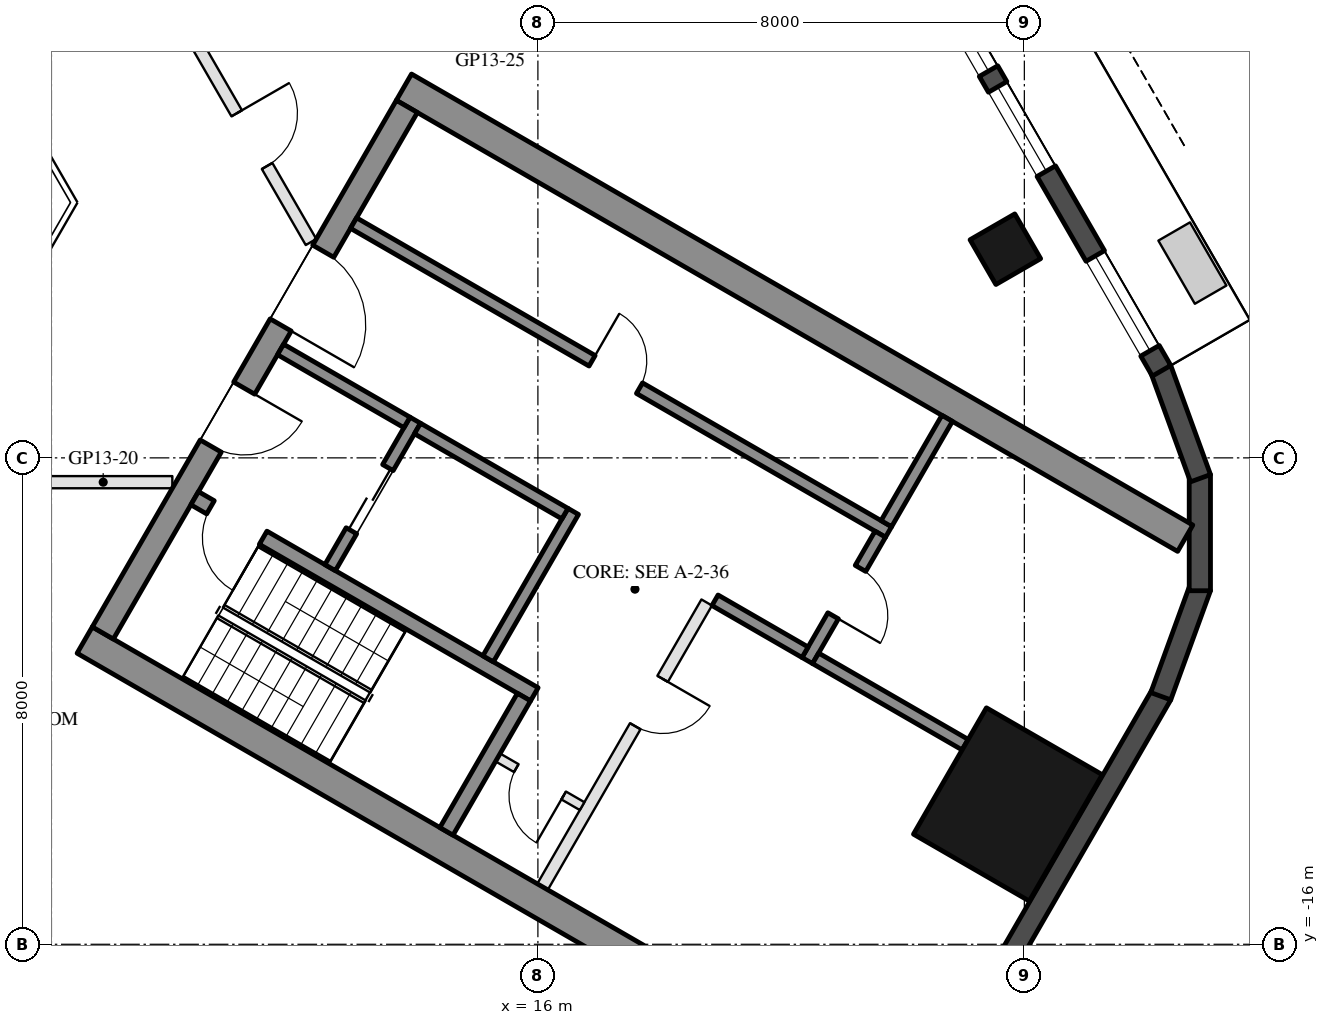
"""IFC4 building model, lengths in metres.
Left out: names, types, materials, properties, quantities, classifications, styles, units other than length and angle.
Written with IfcOpenShell. Run it as: python <this file> out.ifc"""

import sys

from ifc_helpers import new_model, si_unit, direction, frame, frame_2d, origin, origin_2d, place, context, subcontext, project, spatial, rectangle, hollow_rectangle, extrude, element, fill, save


model = new_model("IFC4")
c1 = context("Model", 3, precision=1e-05, world=origin(), true_north=direction((0.0, 1.0)))
c2 = subcontext(c1, "Body", "Model", "MODEL_VIEW")
j1 = project(units=[si_unit("LENGTHUNIT", "METRE"), si_unit("PLANEANGLEUNIT", "RADIAN")], contexts=[c1])
p1 = place(None, origin())
s1 = spatial("IfcSite", under=j1, at=p1, CompositionType="ELEMENT")
p2 = place(p1, origin())
s2 = spatial("IfcBuilding", under=s1, at=p2, CompositionType="ELEMENT")
p3 = place(p2, frame((0.0, 0.0, 157.7)))
s3 = spatial("IfcBuildingStorey", under=s2, at=p3, CompositionType="ELEMENT", Elevation=157.7)
p4 = place(p3, frame((23.688, -4.568, 0.0), z_axis=(0.0, 0.0, 1.0), x_axis=(-0.5, 0.866025403784, 0.0)))
e1 = element("IfcColumn", 1, at=p4, inside=s3, PredefinedType="COLUMN", context=c2, shape_type="SweptSolid", body=[
    extrude(hollow_rectangle(XDim=0.85, YDim=0.85, WallThickness=0.04, at=origin_2d()), origin(), (0.0, 0.0, 1.0), 3.7),
])
p5 = place(p3, frame((23.729, -13.7, 0.0), z_axis=(0.0, 0.0, 1.0), x_axis=(0.5, 0.866025403784, 0.0)))
e2 = element("IfcColumn", 2, at=p5, inside=s3, PredefinedType="COLUMN", context=c2, shape_type="SweptSolid", body=[
    extrude(hollow_rectangle(XDim=2.4, YDim=2.2, WallThickness=0.06, at=origin_2d()), origin(), (0.0, 0.0, 1.0), 3.7),
])
p6 = place(p3, frame((23.427, -16.792, 0.0), z_axis=(0.0, 0.0, 1.0), x_axis=(0.500018773155, 0.866014564827, 0.0)))
e3 = element("IfcWall", 3, at=p6, inside=s3, PredefinedType="SOLIDWALL", context=c2, shape_type="SweptSolid", body=[
    extrude(rectangle(XDim=5.658, YDim=0.35, at=frame_2d((2.829, 0.0))), origin(), (0.0, 0.0, 1.0), 3.55),
])
for number, where, z_axis, x_axis in (
    (4, (26.244, -11.92, 0.0), (0.0, 0.0, 1.0), (0.342, 0.94, 0.0)),
    (5, (26.886, -10.185, 0.0), (0.0, 0.0, 1.0), (0.0, 1.0, 0.0)),
    (6, (26.897, -8.335, 0.0), (0.0, 0.0, 1.0), (-0.342, 0.94, 0.0)),
):
    element("IfcWall", number, at=place(p3, frame(where, z_axis=z_axis, x_axis=x_axis)), inside=s3, PredefinedType="SOLIDWALL", context=c2, shape_type="SweptSolid", body=[
        extrude(rectangle(XDim=1.91, YDim=0.35, at=frame_2d((0.955, 0.0))), origin(), (0.0, 0.0, 1.0), 3.55),
    ])
p7 = place(p3, frame((26.257, -6.567, 0.0), z_axis=(0.0, 0.0, 1.0), x_axis=(-0.500023526245, 0.866011820475, 0.0)))
e7 = element("IfcWall", 7, at=p7, inside=s3, PredefinedType="SOLIDWALL", context=c2, shape_type="SweptSolid", body=[
    extrude(rectangle(XDim=11.816, YDim=0.35, at=frame_2d((5.908, 0.0))), origin(), (0.0, 0.0, 1.0), 3.55),
])
p8 = place(p7, frame((0.38, 0.0, 0.3)))
e8 = element("IfcOpeningElement", 8, at=p8, cuts=e7, PredefinedType="OPENING", context=c2, shape_type="SweptSolid", body=[
    extrude(rectangle(XDim=1.8, YDim=2.65, at=frame_2d((0.9, 1.325))), frame((0.0, 0.185, 0.0), z_axis=(0.0, -1.0, 0.0), x_axis=(1.0, 0.0, 0.0)), (0.0, 0.0, 1.0), 0.37),
])
p9 = place(p7, frame((7.741, 0.0, 0.0)))
e9 = element("IfcOpeningElement", 9, at=p9, cuts=e7, PredefinedType="OPENING", context=c2, shape_type="SweptSolid", body=[
    extrude(rectangle(XDim=2.4, YDim=2.4, at=frame_2d((1.2, 1.2))), frame((0.0, 0.185, 0.0), z_axis=(0.0, -1.0, 0.0), x_axis=(1.0, 0.0, 0.0)), (0.0, 0.0, 1.0), 0.37),
])
p10 = place(p7, frame((3.791, 0.0, 0.3)))
e10 = element("IfcOpeningElement", 10, at=p10, cuts=e7, PredefinedType="OPENING", context=c2, shape_type="SweptSolid", body=[
    extrude(rectangle(XDim=1.6, YDim=2.65, at=frame_2d((0.8, 1.325))), frame((0.0, 0.185, 0.0), z_axis=(0.0, -1.0, 0.0), x_axis=(1.0, 0.0, 0.0)), (0.0, 0.0, 1.0), 0.37),
])
p11 = place(p7, frame((5.691, 0.0, 0.3)))
e11 = element("IfcOpeningElement", 11, at=p11, cuts=e7, PredefinedType="OPENING", context=c2, shape_type="SweptSolid", body=[
    extrude(rectangle(XDim=1.6, YDim=2.65, at=frame_2d((0.8, 1.325))), frame((0.0, 0.185, 0.0), z_axis=(0.0, -1.0, 0.0), x_axis=(1.0, 0.0, 0.0)), (0.0, 0.0, 1.0), 0.37),
])
for number, where, z_axis, x_axis in (
    (12, (8.547, -10.997, 0.0), (0.0, 0.0, 1.0), (0.866, -0.5, 0.0)),
    (13, (13.797, -1.903, 0.0), (0.0, 0.0, 1.0), (0.866, -0.5, 0.0)),
):
    element("IfcWall", number, at=place(p3, frame(where, z_axis=z_axis, x_axis=x_axis)), inside=s3, PredefinedType="SHEAR", context=c2, shape_type="SweptSolid", body=[
        extrude(rectangle(XDim=14.837, YDim=0.5, at=frame_2d((7.418, 0.0))), origin(), (0.0, 0.0, 1.0), 3.5),
    ])
p12 = place(p3, frame((8.845, -10.88, 0.0), z_axis=(0.0, 0.0, 1.0), x_axis=(0.500004234368, 0.866022959057, 0.0)))
e14 = element("IfcWall", 14, at=p12, inside=s3, PredefinedType="SHEAR", context=c2, shape_type="SweptSolid", body=[
    extrude(rectangle(XDim=10.0, YDim=0.4, at=frame_2d((5.0, 0.0))), origin(), (0.0, 0.0, 1.0), 3.5),
])
p13 = place(p12, frame((3.55, 0.0, 0.0)))
e15 = element("IfcOpeningElement", 15, at=p13, cuts=e14, PredefinedType="OPENING", context=c2, shape_type="SweptSolid", body=[
    extrude(rectangle(XDim=1.1, YDim=2.1, at=frame_2d((0.55, 1.05))), frame((0.0, 0.21, 0.0), z_axis=(0.0, -1.0, 0.0), x_axis=(1.0, 0.0, 0.0)), (0.0, 0.0, 1.0), 0.42),
])
p14 = place(p12, frame((5.85, 0.0, 0.0)))
e16 = element("IfcOpeningElement", 16, at=p14, cuts=e14, PredefinedType="OPENING", context=c2, shape_type="SweptSolid", body=[
    extrude(rectangle(XDim=1.4, YDim=2.1, at=frame_2d((0.7, 1.05))), frame((0.0, 0.21, 0.0), z_axis=(0.0, -1.0, 0.0), x_axis=(1.0, 0.0, 0.0)), (0.0, 0.0, 1.0), 0.42),
])
p15 = place(p3, frame((10.356, -8.664, 0.0), z_axis=(0.0, 0.0, 1.0), x_axis=(0.866028629588, -0.499994412703, 0.0)))
e17 = element("IfcWall", 17, at=p15, inside=s3, PredefinedType="SHEAR", context=c2, shape_type="SweptSolid", body=[
    extrude(rectangle(XDim=6.45, YDim=0.25, at=frame_2d((3.225, 0.0))), origin(), (0.0, 0.0, 1.0), 3.5),
])
p16 = place(p15, frame((0.3, 0.0, 0.0)))
e18 = element("IfcOpeningElement", 18, at=p16, cuts=e17, PredefinedType="OPENING", context=c2, shape_type="SweptSolid", body=[
    extrude(rectangle(XDim=1.0, YDim=2.1, at=frame_2d((0.5, 1.05))), frame((0.0, 0.135, 0.0), z_axis=(0.0, -1.0, 0.0), x_axis=(1.0, 0.0, 0.0)), (0.0, 0.0, 1.0), 0.27),
])
p17 = place(p3, frame((14.496, -14.143, 0.0), z_axis=(0.0, 0.0, 1.0), x_axis=(0.500062241894, 0.865989465428, 0.0)))
e19 = element("IfcWall", 19, at=p17, inside=s3, PredefinedType="SHEAR", context=c2, shape_type="SweptSolid", body=[
    extrude(rectangle(XDim=2.55, YDim=0.25, at=frame_2d((1.275, 0.0))), origin(), (0.0, 0.0, 1.0), 3.5),
])
p18 = place(p3, frame((15.181, -11.305, 0.0), z_axis=(0.0, 0.0, 1.0), x_axis=(0.49994636267, 0.866056369097, 0.0)))
e20 = element("IfcWall", 20, at=p18, inside=s3, PredefinedType="SHEAR", context=c2, shape_type="SweptSolid", body=[
    extrude(rectangle(XDim=2.8, YDim=0.2, at=frame_2d((1.4, 0.0))), origin(), (0.0, 0.0, 1.0), 3.5),
])
p19 = place(p3, frame((12.583, -9.805, 0.0), z_axis=(0.0, 0.0, 1.0), x_axis=(0.49994636267, 0.866056369097, 0.0)))
e21 = element("IfcWall", 21, at=p19, inside=s3, PredefinedType="SHEAR", context=c2, shape_type="SweptSolid", body=[
    extrude(rectangle(XDim=2.8, YDim=0.2, at=frame_2d((1.4, 0.0))), origin(), (0.0, 0.0, 1.0), 3.5),
])
p20 = place(p19, frame((0.7, 0.0, 0.0)))
e22 = element("IfcOpeningElement", 22, at=p20, cuts=e21, PredefinedType="OPENING", context=c2, shape_type="SweptSolid", body=[
    extrude(rectangle(XDim=1.2, YDim=2.1, at=frame_2d((0.6, 1.05))), frame((0.0, 0.11, 0.0), z_axis=(0.0, -1.0, 0.0), x_axis=(1.0, 0.0, 0.0)), (0.0, 0.0, 1.0), 0.22),
])
p21 = place(p3, frame((11.768, -6.217, 0.0), z_axis=(0.0, 0.0, 1.0), x_axis=(0.866050077142, -0.499957262057, 0.0)))
e23 = element("IfcWall", 23, at=p21, inside=s3, PredefinedType="SHEAR", context=c2, shape_type="SweptSolid", body=[
    extrude(rectangle(XDim=2.4, YDim=0.2, at=frame_2d((1.2, 0.0))), origin(), (0.0, 0.0, 1.0), 3.5),
])
p22 = place(p3, frame((14.02, -7.517, 0.0), z_axis=(0.0, 0.0, 1.0), x_axis=(0.866034573852, -0.49998411664, 0.0)))
e24 = element("IfcWall", 24, at=p22, inside=s3, PredefinedType="SHEAR", context=c2, shape_type="SweptSolid", body=[
    extrude(rectangle(XDim=2.8, YDim=0.2, at=frame_2d((1.4, 0.0))), origin(), (0.0, 0.0, 1.0), 3.5),
])
p23 = place(p3, frame((12.968, -4.138, 0.0), z_axis=(0.0, 0.0, 1.0), x_axis=(0.866028328073, -0.49999493495, 0.0)))
e25 = element("IfcWall", 25, at=p23, inside=s3, PredefinedType="SHEAR", context=c2, shape_type="SweptSolid", body=[
    extrude(rectangle(XDim=10.16, YDim=0.2, at=frame_2d((5.08, 0.0))), origin(), (0.0, 0.0, 1.0), 3.5),
])
p24 = place(p23, frame((4.53, 0.0, 0.0)))
e26 = element("IfcOpeningElement", 26, at=p24, cuts=e25, PredefinedType="OPENING", context=c2, shape_type="SweptSolid", body=[
    extrude(rectangle(XDim=0.9, YDim=2.1, at=frame_2d((0.45, 1.05))), frame((0.0, 0.11, 0.0), z_axis=(0.0, -1.0, 0.0), x_axis=(1.0, 0.0, 0.0)), (0.0, 0.0, 1.0), 0.22),
])
p25 = place(p3, frame((20.43, -11.333, 0.0), z_axis=(0.0, 0.0, 1.0), x_axis=(0.500001309137, 0.866024647952, 0.0)))
e27 = element("IfcWall", 27, at=p25, inside=s3, PredefinedType="SHEAR", context=c2, shape_type="SweptSolid", body=[
    extrude(rectangle(XDim=2.4, YDim=0.2, at=frame_2d((1.2, 0.0))), origin(), (0.0, 0.0, 1.0), 3.5),
])
p26 = place(p25, frame((0.85, 0.0, 0.0)))
e28 = element("IfcOpeningElement", 28, at=p26, cuts=e27, PredefinedType="OPENING", context=c2, shape_type="SweptSolid", body=[
    extrude(rectangle(XDim=0.9, YDim=2.1, at=frame_2d((0.45, 1.05))), frame((0.0, 0.11, 0.0), z_axis=(0.0, -1.0, 0.0), x_axis=(1.0, 0.0, 0.0)), (0.0, 0.0, 1.0), 0.22),
])
p27 = place(p3, frame((18.913, -10.342, 0.0), z_axis=(0.0, 0.0, 1.0), x_axis=(0.866038183914, -0.499977863513, 0.0)))
e29 = element("IfcWall", 29, at=p27, inside=s3, PredefinedType="SHEAR", context=c2, shape_type="SweptSolid", body=[
    extrude(rectangle(XDim=1.71, YDim=0.2, at=frame_2d((0.855, 0.0))), origin(), (0.0, 0.0, 1.0), 3.5),
])
p28 = place(p3, frame((21.73, -9.082, 0.0), z_axis=(0.0, 0.0, 1.0), x_axis=(0.50002537861, 0.866010750942, 0.0)))
e30 = element("IfcWall", 30, at=p28, inside=s3, PredefinedType="SHEAR", context=c2, shape_type="SweptSolid", body=[
    extrude(rectangle(XDim=2.0, YDim=0.2, at=frame_2d((1.0, 0.0))), origin(), (0.0, 0.0, 1.0), 3.5),
])
p29 = place(p3, frame((20.567, -11.297, 0.0), z_axis=(0.0, 0.0, 1.0), x_axis=(0.866055327414, -0.49994816717, 0.0)))
e31 = element("IfcWall", 31, at=p29, inside=s3, PredefinedType="SHEAR", context=c2, shape_type="SweptSolid", body=[
    extrude(rectangle(XDim=2.84, YDim=0.2, at=frame_2d((1.42, 0.0))), origin(), (0.0, 0.0, 1.0), 3.5),
])
p30 = place(p3, frame((16.076, -15.055, 0.0), z_axis=(0.0, 0.0, 1.0), x_axis=(0.499995103361, 0.866028230842, 0.0)))
e32 = element("IfcWall", 32, at=p30, inside=s3, PredefinedType="PARTITIONING", context=c2, shape_type="SweptSolid", body=[
    extrude(rectangle(XDim=5.4, YDim=0.2, at=frame_2d((2.7, 0.0))), origin(), (0.0, 0.0, 1.0), 3.5),
])
p31 = place(p30, frame((3.05, 0.0, 0.0)))
e33 = element("IfcOpeningElement", 33, at=p31, cuts=e32, PredefinedType="OPENING", context=c2, shape_type="SweptSolid", body=[
    extrude(rectangle(XDim=0.9, YDim=2.1, at=frame_2d((0.45, 1.05))), frame((0.0, 0.11, 0.0), z_axis=(0.0, -1.0, 0.0), x_axis=(1.0, 0.0, 0.0)), (0.0, 0.0, 1.0), 0.22),
])
p32 = place(p3, frame((15.342, -12.928, 0.0), z_axis=(0.0, 0.0, 1.0), x_axis=(0.865989903783, -0.500061482766, 0.0)))
e34 = element("IfcWall", 34, at=p32, inside=s3, PredefinedType="PARTITIONING", context=c2, shape_type="SweptSolid", body=[
    extrude(rectangle(XDim=1.6, YDim=0.15, at=frame_2d((0.8, 0.0))), origin(), (0.0, 0.0, 1.0), 3.5),
])
p33 = place(p32, frame((0.35, 0.0, 0.0)))
e35 = element("IfcOpeningElement", 35, at=p33, cuts=e34, PredefinedType="OPENING", context=c2, shape_type="SweptSolid", body=[
    extrude(rectangle(XDim=0.9, YDim=2.1, at=frame_2d((0.45, 1.05))), frame((0.0, 0.085, 0.0), z_axis=(0.0, -1.0, 0.0), x_axis=(1.0, 0.0, 0.0)), (0.0, 0.0, 1.0), 0.17),
])
p34 = place(p3, frame((9.988, -8.4, 0.0), z_axis=(0.0, 0.0, 1.0), x_axis=(-1.0, 0.0, 0.0)))
e36 = element("IfcWall", 36, at=p34, inside=s3, PredefinedType="PARTITIONING", context=c2, shape_type="SweptSolid", body=[
    extrude(rectangle(XDim=5.686, YDim=0.2, at=frame_2d((2.843, 0.0))), origin(), (0.0, 0.0, 1.0), 2.95),
])
p35 = place(p34, frame((2.343, 0.0, 0.0)))
e37 = element("IfcOpeningElement", 37, at=p35, cuts=e36, PredefinedType="OPENING", context=c2, shape_type="SweptSolid", body=[
    extrude(rectangle(XDim=1.0, YDim=2.1, at=frame_2d((0.5, 1.05))), frame((0.0, 0.11, 0.0), z_axis=(0.0, -1.0, 0.0), x_axis=(1.0, 0.0, 0.0)), (0.0, 0.0, 1.0), 0.22),
])
p36 = place(p3, frame((10.325, -1.083, 0.0), z_axis=(0.0, 0.0, 1.0), x_axis=(0.500008716408, -0.866020371305, 0.0)))
e38 = element("IfcWall", 38, at=p36, inside=s3, PredefinedType="PARTITIONING", context=c2, shape_type="SweptSolid", body=[
    extrude(rectangle(XDim=3.888, YDim=0.2, at=frame_2d((1.944, 0.0))), origin(), (0.0, 0.0, 1.0), 2.95),
])
p37 = place(p36, frame((1.444, 0.0, 0.0)))
e39 = element("IfcOpeningElement", 39, at=p37, cuts=e38, PredefinedType="OPENING", context=c2, shape_type="SweptSolid", body=[
    extrude(rectangle(XDim=1.0, YDim=2.1, at=frame_2d((0.5, 1.05))), frame((0.0, 0.11, 0.0), z_axis=(0.0, -1.0, 0.0), x_axis=(1.0, 0.0, 0.0)), (0.0, 0.0, 1.0), 0.22),
])
p38 = place(p8, origin())
e40 = element("IfcWindow", 40, at=p38, inside=s3, PartitioningType="SINGLE_PANEL", PredefinedType="WINDOW", context=c2, shape_type="SweptSolid", body=[
    extrude(rectangle(XDim=1.8, YDim=2.65, at=frame_2d((0.9, 1.325))), frame((0.0, 0.03, 0.0), z_axis=(0.0, -1.0, 0.0), x_axis=(1.0, 0.0, 0.0)), (0.0, 0.0, 1.0), 0.06),
])
fill(e8, e40)
p39 = place(p10, origin())
e41 = element("IfcWindow", 41, at=p39, inside=s3, PartitioningType="SINGLE_PANEL", PredefinedType="WINDOW", context=c2, shape_type="SweptSolid", body=[
    extrude(rectangle(XDim=1.6, YDim=2.65, at=frame_2d((0.8, 1.325))), frame((0.0, 0.03, 0.0), z_axis=(0.0, -1.0, 0.0), x_axis=(1.0, 0.0, 0.0)), (0.0, 0.0, 1.0), 0.06),
])
fill(e10, e41)
p40 = place(p11, origin())
e42 = element("IfcWindow", 42, at=p40, inside=s3, PartitioningType="SINGLE_PANEL", PredefinedType="WINDOW", context=c2, shape_type="SweptSolid", body=[
    extrude(rectangle(XDim=1.6, YDim=2.65, at=frame_2d((0.8, 1.325))), frame((0.0, 0.03, 0.0), z_axis=(0.0, -1.0, 0.0), x_axis=(1.0, 0.0, 0.0)), (0.0, 0.0, 1.0), 0.06),
])
fill(e11, e42)
p41 = place(p20, origin())
e43 = element("IfcDoor", 43, at=p41, inside=s3, OperationType="DOUBLE_DOOR_SLIDING", PredefinedType="DOOR", context=c2, shape_type="SweptSolid", body=[
    extrude(rectangle(XDim=1.2, YDim=2.1, at=frame_2d((0.6, 1.05))), frame((0.0, 0.025, 0.0), z_axis=(0.0, -1.0, 0.0), x_axis=(1.0, 0.0, 0.0)), (0.0, 0.0, 1.0), 0.05),
])
fill(e22, e43)
p42 = place(p33, frame((0.9, 0.0, 0.0), z_axis=(0.0, 0.0, 1.0), x_axis=(-1.0, 0.0, 0.0)))
e44 = element("IfcDoor", 44, at=p42, inside=s3, OperationType="SINGLE_SWING_LEFT", PredefinedType="DOOR", context=c2, shape_type="SweptSolid", body=[
    extrude(rectangle(XDim=0.9, YDim=2.1, at=frame_2d((0.45, 1.05))), frame((0.0, 0.025, 0.0), z_axis=(0.0, -1.0, 0.0), x_axis=(1.0, 0.0, 0.0)), (0.0, 0.0, 1.0), 0.05),
])
fill(e35, e44)
p43 = place(p24, origin())
e45 = element("IfcDoor", 45, at=p43, inside=s3, OperationType="SINGLE_SWING_LEFT", PredefinedType="DOOR", context=c2, shape_type="SweptSolid", body=[
    extrude(rectangle(XDim=0.9, YDim=2.1, at=frame_2d((0.45, 1.05))), frame((0.0, 0.025, 0.0), z_axis=(0.0, -1.0, 0.0), x_axis=(1.0, 0.0, 0.0)), (0.0, 0.0, 1.0), 0.05),
])
fill(e26, e45)
p44 = place(p26, frame((0.9, 0.0, 0.0), z_axis=(0.0, 0.0, 1.0), x_axis=(-1.0, 0.0, 0.0)))
e46 = element("IfcDoor", 46, at=p44, inside=s3, OperationType="SINGLE_SWING_RIGHT", PredefinedType="DOOR", context=c2, shape_type="SweptSolid", body=[
    extrude(rectangle(XDim=0.9, YDim=2.1, at=frame_2d((0.45, 1.05))), frame((0.0, 0.025, 0.0), z_axis=(0.0, -1.0, 0.0), x_axis=(1.0, 0.0, 0.0)), (0.0, 0.0, 1.0), 0.05),
])
fill(e28, e46)
p45 = place(p31, frame((0.9, 0.0, 0.0), z_axis=(0.0, 0.0, 1.0), x_axis=(-1.0, 0.0, 0.0)))
e47 = element("IfcDoor", 47, at=p45, inside=s3, OperationType="SINGLE_SWING_LEFT", PredefinedType="DOOR", context=c2, shape_type="SweptSolid", body=[
    extrude(rectangle(XDim=0.9, YDim=2.1, at=frame_2d((0.45, 1.05))), frame((0.0, 0.025, 0.0), z_axis=(0.0, -1.0, 0.0), x_axis=(1.0, 0.0, 0.0)), (0.0, 0.0, 1.0), 0.05),
])
fill(e33, e47)
p46 = place(p13, frame((1.1, 0.0, 0.0), z_axis=(0.0, 0.0, 1.0), x_axis=(-1.0, 0.0, 0.0)))
e48 = element("IfcDoor", 48, at=p46, inside=s3, OperationType="SINGLE_SWING_LEFT", PredefinedType="DOOR", context=c2, shape_type="SweptSolid", body=[
    extrude(rectangle(XDim=1.1, YDim=2.1, at=frame_2d((0.55, 1.05))), frame((0.0, 0.025, 0.0), z_axis=(0.0, -1.0, 0.0), x_axis=(1.0, 0.0, 0.0)), (0.0, 0.0, 1.0), 0.05),
])
fill(e15, e48)
p47 = place(p14, frame((1.4, 0.0, 0.0), z_axis=(0.0, 0.0, 1.0), x_axis=(-1.0, 0.0, 0.0)))
e49 = element("IfcDoor", 49, at=p47, inside=s3, OperationType="DOUBLE_DOOR_SINGLE_SWING", PredefinedType="DOOR", context=c2, shape_type="SweptSolid", body=[
    extrude(rectangle(XDim=1.4, YDim=2.1, at=frame_2d((0.7, 1.05))), frame((0.0, 0.025, 0.0), z_axis=(0.0, -1.0, 0.0), x_axis=(1.0, 0.0, 0.0)), (0.0, 0.0, 1.0), 0.05),
])
fill(e16, e49)
p48 = place(p16, frame((1.0, 0.0, 0.0), z_axis=(0.0, 0.0, 1.0), x_axis=(-1.0, 0.0, 0.0)))
e50 = element("IfcDoor", 50, at=p48, inside=s3, OperationType="SINGLE_SWING_LEFT", PredefinedType="DOOR", context=c2, shape_type="SweptSolid", body=[
    extrude(rectangle(XDim=1.0, YDim=2.1, at=frame_2d((0.5, 1.05))), frame((0.0, 0.025, 0.0), z_axis=(0.0, -1.0, 0.0), x_axis=(1.0, 0.0, 0.0)), (0.0, 0.0, 1.0), 0.05),
])
fill(e18, e50)
p49 = place(p37, origin())
e51 = element("IfcDoor", 51, at=p49, inside=s3, OperationType="SINGLE_SWING_LEFT", PredefinedType="DOOR", context=c2, shape_type="SweptSolid", body=[
    extrude(rectangle(XDim=1.0, YDim=2.1, at=frame_2d((0.5, 1.05))), frame((0.0, 0.025, 0.0), z_axis=(0.0, -1.0, 0.0), x_axis=(1.0, 0.0, 0.0)), (0.0, 0.0, 1.0), 0.05),
])
fill(e39, e51)
save(model, sys.argv[1])
